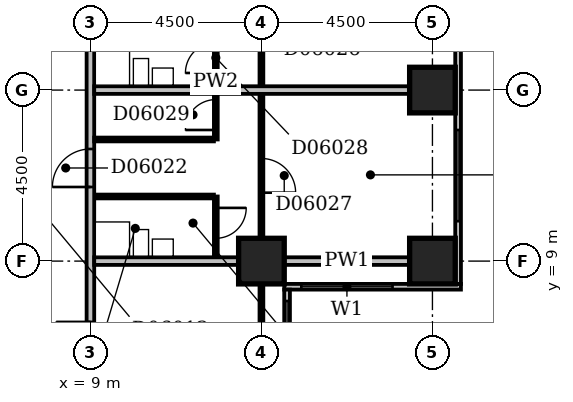
"""IFC4 building model, lengths in metres.
Left out: names, types, materials, properties, quantities, classifications, styles, units other than length and angle.
Written with IfcOpenShell. Run it as: python <this file> out.ifc"""

import sys

from ifc_helpers import new_model, si_unit, direction, frame, frame_2d, origin, origin_2d, place, context, subcontext, project, spatial, rectangle, extrude, element, fill, save


model = new_model("IFC4")
c1 = context("Model", 3, precision=1e-05, world=origin(), true_north=direction((0.0, 1.0)))
c2 = subcontext(c1, "Body", "Model", "MODEL_VIEW")
j1 = project(units=[si_unit("LENGTHUNIT", "METRE"), si_unit("PLANEANGLEUNIT", "RADIAN")], contexts=[c1])
p1 = place(None, origin())
s1 = spatial("IfcSite", under=j1, at=p1, CompositionType="ELEMENT")
p2 = place(p1, origin())
s2 = spatial("IfcBuilding", under=s1, at=p2, CompositionType="ELEMENT")
p3 = place(p2, frame((0.0, 0.0, 32.6)))
s3 = spatial("IfcBuildingStorey", under=s2, at=p3, CompositionType="ELEMENT", Elevation=32.6)
for number, where, z_axis, x_axis in (
    (1, (13.5, 9.0, -0.3), (0.0, 0.0, 1.0), (1.0, 0.0, 0.0)),
    (2, (18.0, 9.0, -0.3), (0.0, 0.0, 1.0), (1.0, 0.0, 0.0)),
    (3, (18.0, 13.5, -0.3), (0.0, 0.0, 1.0), (1.0, 0.0, 0.0)),
):
    element("IfcColumn", number, at=place(p3, frame(where, z_axis=z_axis, x_axis=x_axis)), inside=s3, PredefinedType="COLUMN", context=c2, shape_type="SweptSolid", body=[
        extrude(rectangle(XDim=1.2, YDim=1.2, at=origin_2d()), origin(), (0.0, 0.0, 1.0), 3.6),
    ])
p4 = place(p3, frame((14.175, 3.9, 0.0), z_axis=(0.0, 0.0, 1.0), x_axis=(0.0, 1.0, 0.0)))
e4 = element("IfcWall", 4, at=p4, inside=s3, PredefinedType="STANDARD", context=c2, shape_type="SweptSolid", body=[
    extrude(rectangle(XDim=4.35, YDim=0.15, at=frame_2d((2.175, 0.0))), origin(), (0.0, 0.0, 1.0), 2.7),
])
p5 = place(p4, frame((1.65, 0.0, 0.6)))
e5 = element("IfcOpeningElement", 5, at=p5, cuts=e4, PredefinedType="OPENING", context=c2, shape_type="SweptSolid", body=[
    extrude(rectangle(XDim=2.4, YDim=1.8, at=frame_2d((1.2, 0.9))), frame((0.0, 0.087, 0.0), z_axis=(0.0, -1.0, 0.0), x_axis=(1.0, 0.0, 0.0)), (0.0, 0.0, 1.0), 0.174),
])
p6 = place(p3, frame((14.1, 8.325, 0.0), z_axis=(0.0, 0.0, 1.0), x_axis=(1.0, 0.0, 0.0)))
e6 = element("IfcWall", 6, at=p6, inside=s3, PredefinedType="STANDARD", context=c2, shape_type="SweptSolid", body=[
    extrude(rectangle(XDim=4.65, YDim=0.15, at=frame_2d((2.325, 0.0))), origin(), (0.0, 0.0, 1.0), 2.7),
])
p7 = place(p6, frame((0.45, 0.0, 0.6)))
e7 = element("IfcOpeningElement", 7, at=p7, cuts=e6, PredefinedType="OPENING", context=c2, shape_type="SweptSolid", body=[
    extrude(rectangle(XDim=2.4, YDim=1.8, at=frame_2d((1.2, 0.9))), frame((0.0, 0.087, 0.0), z_axis=(0.0, -1.0, 0.0), x_axis=(1.0, 0.0, 0.0)), (0.0, 0.0, 1.0), 0.174),
])
p8 = place(p3, frame((18.675, 8.4, 0.0), z_axis=(0.0, 0.0, 1.0), x_axis=(0.0, 1.0, 0.0)))
e8 = element("IfcWall", 8, at=p8, inside=s3, PredefinedType="STANDARD", context=c2, shape_type="SweptSolid", body=[
    extrude(rectangle(XDim=8.85, YDim=0.15, at=frame_2d((4.425, 0.0))), origin(), (0.0, 0.0, 1.0), 2.7),
])
p9 = place(p8, frame((1.65, 0.0, 0.6)))
e9 = element("IfcOpeningElement", 9, at=p9, cuts=e8, PredefinedType="OPENING", context=c2, shape_type="SweptSolid", body=[
    extrude(rectangle(XDim=2.4, YDim=1.8, at=frame_2d((1.2, 0.9))), frame((0.0, 0.087, 0.0), z_axis=(0.0, -1.0, 0.0), x_axis=(1.0, 0.0, 0.0)), (0.0, 0.0, 1.0), 0.174),
])
p10 = place(p8, frame((7.309, 0.0, 0.6)))
e10 = element("IfcOpeningElement", 10, at=p10, cuts=e8, PredefinedType="OPENING", context=c2, shape_type="SweptSolid", body=[
    extrude(rectangle(XDim=1.2, YDim=1.8, at=frame_2d((0.6, 0.9))), frame((0.0, 0.087, 0.0), z_axis=(0.0, -1.0, 0.0), x_axis=(1.0, 0.0, 0.0)), (0.0, 0.0, 1.0), 0.174),
])
p11 = place(p3, frame((9.0, 5.0, 0.0), z_axis=(0.0, 0.0, 1.0), x_axis=(0.0, 1.0, 0.0)))
e11 = element("IfcWall", 11, at=p11, inside=s3, PredefinedType="PARTITIONING", context=c2, shape_type="SweptSolid", body=[
    extrude(rectangle(XDim=44.5, YDim=0.2, at=frame_2d((22.25, 0.0))), origin(), (0.0, 0.0, 1.0), 3.3),
])
p12 = place(p11, frame((24.7, 0.0, 0.0)))
e12 = element("IfcOpeningElement", 12, at=p12, cuts=e11, PredefinedType="OPENING", context=c2, shape_type="SweptSolid", body=[
    extrude(rectangle(XDim=1.0, YDim=2.1, at=frame_2d((0.5, 1.05))), frame((0.0, 0.112, 0.0), z_axis=(0.0, -1.0, 0.0), x_axis=(1.0, 0.0, 0.0)), (0.0, 0.0, 1.0), 0.224),
])
p13 = place(p11, frame((13.3, 0.0, 0.0)))
e13 = element("IfcOpeningElement", 13, at=p13, cuts=e11, PredefinedType="OPENING", context=c2, shape_type="SweptSolid", body=[
    extrude(rectangle(XDim=1.0, YDim=2.1, at=frame_2d((0.5, 1.05))), frame((0.0, 0.112, 0.0), z_axis=(0.0, -1.0, 0.0), x_axis=(1.0, 0.0, 0.0)), (0.0, 0.0, 1.0), 0.224),
])
p14 = place(p11, frame((10.45, 0.0, 0.0)))
e14 = element("IfcOpeningElement", 14, at=p14, cuts=e11, PredefinedType="OPENING", context=c2, shape_type="SweptSolid", body=[
    extrude(rectangle(XDim=1.0, YDim=2.1, at=frame_2d((0.5, 1.05))), frame((0.0, 0.112, 0.0), z_axis=(0.0, -1.0, 0.0), x_axis=(1.0, 0.0, 0.0)), (0.0, 0.0, 1.0), 0.224),
])
p15 = place(p11, frame((5.95, 0.0, 0.0)))
e15 = element("IfcOpeningElement", 15, at=p15, cuts=e11, PredefinedType="OPENING", context=c2, shape_type="SweptSolid", body=[
    extrude(rectangle(XDim=1.0, YDim=2.1, at=frame_2d((0.5, 1.05))), frame((0.0, 0.112, 0.0), z_axis=(0.0, -1.0, 0.0), x_axis=(1.0, 0.0, 0.0)), (0.0, 0.0, 1.0), 0.224),
])
p16 = place(p11, frame((37.25, 0.0, 0.0)))
e16 = element("IfcOpeningElement", 16, at=p16, cuts=e11, PredefinedType="OPENING", context=c2, shape_type="SweptSolid", body=[
    extrude(rectangle(XDim=0.9, YDim=2.1, at=frame_2d((0.45, 1.05))), frame((0.0, 0.112, 0.0), z_axis=(0.0, -1.0, 0.0), x_axis=(1.0, 0.0, 0.0)), (0.0, 0.0, 1.0), 0.224),
])
p17 = place(p11, frame((1.5, 0.0, 0.0)))
e17 = element("IfcOpeningElement", 17, at=p17, cuts=e11, PredefinedType="OPENING", context=c2, shape_type="SweptSolid", body=[
    extrude(rectangle(XDim=0.9, YDim=2.1, at=frame_2d((0.45, 1.05))), frame((0.0, 0.112, 0.0), z_axis=(0.0, -1.0, 0.0), x_axis=(1.0, 0.0, 0.0)), (0.0, 0.0, 1.0), 0.224),
])
p18 = place(p3, frame((13.5, 5.1, 0.0), z_axis=(0.0, 0.0, 1.0), x_axis=(0.0, 1.0, 0.0)))
e18 = element("IfcWall", 18, at=p18, inside=s3, PredefinedType="PARTITIONING", context=c2, shape_type="SweptSolid", body=[
    extrude(rectangle(XDim=3.3, YDim=0.1, at=frame_2d((1.65, 0.0))), origin(), (0.0, 0.0, 1.0), 2.7),
])
p19 = place(p3, frame((9.1, 9.0, 0.0), z_axis=(0.0, 0.0, 1.0), x_axis=(1.0, 0.0, 0.0)))
e19 = element("IfcWall", 19, at=p19, inside=s3, PredefinedType="PARTITIONING", context=c2, shape_type="SweptSolid", body=[
    extrude(rectangle(XDim=3.8, YDim=0.2, at=frame_2d((1.9, 0.0))), origin(), (0.0, 0.0, 1.0), 3.3),
])
p20 = place(p3, frame((14.1, 9.0, 0.0), z_axis=(0.0, 0.0, 1.0), x_axis=(1.0, 0.0, 0.0)))
e20 = element("IfcWall", 20, at=p20, inside=s3, PredefinedType="PARTITIONING", context=c2, shape_type="SweptSolid", body=[
    extrude(rectangle(XDim=3.3, YDim=0.2, at=frame_2d((1.65, 0.0))), origin(), (0.0, 0.0, 1.0), 2.7),
])
p21 = place(p3, frame((12.3, 9.1, 0.0), z_axis=(0.0, 0.0, 1.0), x_axis=(0.0, 1.0, 0.0)))
e21 = element("IfcWall", 21, at=p21, inside=s3, PredefinedType="PARTITIONING", context=c2, shape_type="SweptSolid", body=[
    extrude(rectangle(XDim=1.6, YDim=0.1, at=frame_2d((0.8, 0.0))), origin(), (0.0, 0.0, 1.0), 3.3),
])
p22 = place(p21, frame((0.5, 0.0, 0.0)))
e22 = element("IfcOpeningElement", 22, at=p22, cuts=e21, PredefinedType="OPENING", context=c2, shape_type="SweptSolid", body=[
    extrude(rectangle(XDim=0.8, YDim=2.1, at=frame_2d((0.4, 1.05))), frame((0.0, 0.062, 0.0), z_axis=(0.0, -1.0, 0.0), x_axis=(1.0, 0.0, 0.0)), (0.0, 0.0, 1.0), 0.124),
])
p23 = place(p3, frame((13.5, 9.6, 0.0), z_axis=(0.0, 0.0, 1.0), x_axis=(0.0, 1.0, 0.0)))
e23 = element("IfcWall", 23, at=p23, inside=s3, PredefinedType="PARTITIONING", context=c2, shape_type="SweptSolid", body=[
    extrude(rectangle(XDim=8.3, YDim=0.1, at=frame_2d((4.15, 0.0))), origin(), (0.0, 0.0, 1.0), 3.3),
])
p24 = place(p23, frame((5.7, 0.0, 0.0)))
e24 = element("IfcOpeningElement", 24, at=p24, cuts=e23, PredefinedType="OPENING", context=c2, shape_type="SweptSolid", body=[
    extrude(rectangle(XDim=0.9, YDim=2.1, at=frame_2d((0.45, 1.05))), frame((0.0, 0.062, 0.0), z_axis=(0.0, -1.0, 0.0), x_axis=(1.0, 0.0, 0.0)), (0.0, 0.0, 1.0), 0.124),
])
p25 = place(p23, frame((1.2, 0.0, 0.0)))
e25 = element("IfcOpeningElement", 25, at=p25, cuts=e23, PredefinedType="OPENING", context=c2, shape_type="SweptSolid", body=[
    extrude(rectangle(XDim=0.9, YDim=2.1, at=frame_2d((0.45, 1.05))), frame((0.0, 0.062, 0.0), z_axis=(0.0, -1.0, 0.0), x_axis=(1.0, 0.0, 0.0)), (0.0, 0.0, 1.0), 0.124),
])
p26 = place(p3, frame((9.1, 10.7, 0.0), z_axis=(0.0, 0.0, 1.0), x_axis=(1.0, 0.0, 0.0)))
e26 = element("IfcWall", 26, at=p26, inside=s3, PredefinedType="PLUMBINGWALL", context=c2, shape_type="SweptSolid", body=[
    extrude(rectangle(XDim=3.15, YDim=0.1, at=frame_2d((1.575, 0.0))), origin(), (0.0, 0.0, 1.0), 3.3),
])
p27 = place(p3, frame((9.1, 12.2, 0.0), z_axis=(0.0, 0.0, 1.0), x_axis=(1.0, 0.0, 0.0)))
e27 = element("IfcWall", 27, at=p27, inside=s3, PredefinedType="PARTITIONING", context=c2, shape_type="SweptSolid", body=[
    extrude(rectangle(XDim=3.15, YDim=0.1, at=frame_2d((1.575, 0.0))), origin(), (0.0, 0.0, 1.0), 3.3),
])
p28 = place(p3, frame((12.3, 12.2, 0.0), z_axis=(0.0, 0.0, 1.0), x_axis=(0.0, 1.0, 0.0)))
e28 = element("IfcWall", 28, at=p28, inside=s3, PredefinedType="PARTITIONING", context=c2, shape_type="SweptSolid", body=[
    extrude(rectangle(XDim=3.0, YDim=0.1, at=frame_2d((1.5, 0.0))), origin(), (0.0, 0.0, 1.0), 3.3),
])
p29 = place(p28, frame((1.75, 0.0, 0.0)))
e29 = element("IfcOpeningElement", 29, at=p29, cuts=e28, PredefinedType="OPENING", context=c2, shape_type="SweptSolid", body=[
    extrude(rectangle(XDim=0.8, YDim=2.1, at=frame_2d((0.4, 1.05))), frame((0.0, 0.062, 0.0), z_axis=(0.0, -1.0, 0.0), x_axis=(1.0, 0.0, 0.0)), (0.0, 0.0, 1.0), 0.124),
])
p30 = place(p28, frame((0.25, 0.0, 0.0)))
e30 = element("IfcOpeningElement", 30, at=p30, cuts=e28, PredefinedType="OPENING", context=c2, shape_type="SweptSolid", body=[
    extrude(rectangle(XDim=0.8, YDim=2.1, at=frame_2d((0.4, 1.05))), frame((0.0, 0.062, 0.0), z_axis=(0.0, -1.0, 0.0), x_axis=(1.0, 0.0, 0.0)), (0.0, 0.0, 1.0), 0.124),
])
p31 = place(p3, frame((9.1, 13.5, 0.0), z_axis=(0.0, 0.0, 1.0), x_axis=(1.0, 0.0, 0.0)))
e31 = element("IfcWall", 31, at=p31, inside=s3, PredefinedType="PARTITIONING", context=c2, shape_type="SweptSolid", body=[
    extrude(rectangle(XDim=8.3, YDim=0.2, at=frame_2d((4.15, 0.0))), origin(), (0.0, 0.0, 1.0), 3.3),
])
p32 = place(p5, origin())
e32 = element("IfcWindow", 32, at=p32, inside=s3, PartitioningType="SINGLE_PANEL", PredefinedType="WINDOW", context=c2, shape_type="SweptSolid", body=[
    extrude(rectangle(XDim=2.4, YDim=1.8, at=frame_2d((1.2, 0.9))), frame((0.0, 0.03, 0.0), z_axis=(0.0, -1.0, 0.0), x_axis=(1.0, 0.0, 0.0)), (0.0, 0.0, 1.0), 0.06),
])
fill(e5, e32)
p33 = place(p7, origin())
e33 = element("IfcWindow", 33, at=p33, inside=s3, PartitioningType="SINGLE_PANEL", PredefinedType="WINDOW", context=c2, shape_type="SweptSolid", body=[
    extrude(rectangle(XDim=2.4, YDim=1.8, at=frame_2d((1.2, 0.9))), frame((0.0, 0.03, 0.0), z_axis=(0.0, -1.0, 0.0), x_axis=(1.0, 0.0, 0.0)), (0.0, 0.0, 1.0), 0.06),
])
fill(e7, e33)
p34 = place(p9, origin())
e34 = element("IfcWindow", 34, at=p34, inside=s3, PartitioningType="SINGLE_PANEL", PredefinedType="WINDOW", context=c2, shape_type="SweptSolid", body=[
    extrude(rectangle(XDim=2.4, YDim=1.8, at=frame_2d((1.2, 0.9))), frame((0.0, 0.03, 0.0), z_axis=(0.0, -1.0, 0.0), x_axis=(1.0, 0.0, 0.0)), (0.0, 0.0, 1.0), 0.06),
])
fill(e9, e34)
p35 = place(p15, origin())
e35 = element("IfcDoor", 35, at=p35, inside=s3, OperationType="SINGLE_SWING_LEFT", PredefinedType="DOOR", context=c2, shape_type="SweptSolid", body=[
    extrude(rectangle(XDim=1.0, YDim=2.1, at=frame_2d((0.5, 1.05))), frame((0.0, 0.025, 0.0), z_axis=(0.0, -1.0, 0.0), x_axis=(1.0, 0.0, 0.0)), (0.0, 0.0, 1.0), 0.05),
])
fill(e15, e35)
p36 = place(p22, origin())
e36 = element("IfcDoor", 36, at=p36, inside=s3, OperationType="SINGLE_SWING_RIGHT", PredefinedType="DOOR", context=c2, shape_type="SweptSolid", body=[
    extrude(rectangle(XDim=0.8, YDim=2.1, at=frame_2d((0.4, 1.05))), frame((0.0, 0.025, 0.0), z_axis=(0.0, -1.0, 0.0), x_axis=(1.0, 0.0, 0.0)), (0.0, 0.0, 1.0), 0.05),
])
fill(e22, e36)
p37 = place(p25, frame((0.9, 0.0, 0.0), z_axis=(0.0, 0.0, 1.0), x_axis=(-1.0, 0.0, 0.0)))
e37 = element("IfcDoor", 37, at=p37, inside=s3, OperationType="SINGLE_SWING_RIGHT", PredefinedType="DOOR", context=c2, shape_type="SweptSolid", body=[
    extrude(rectangle(XDim=0.9, YDim=2.1, at=frame_2d((0.45, 1.05))), frame((0.0, 0.025, 0.0), z_axis=(0.0, -1.0, 0.0), x_axis=(1.0, 0.0, 0.0)), (0.0, 0.0, 1.0), 0.05),
])
fill(e25, e37)
p38 = place(p29, origin())
e38 = element("IfcDoor", 38, at=p38, inside=s3, OperationType="SINGLE_SWING_LEFT", PredefinedType="DOOR", context=c2, shape_type="SweptSolid", body=[
    extrude(rectangle(XDim=0.8, YDim=2.1, at=frame_2d((0.4, 1.05))), frame((0.0, 0.025, 0.0), z_axis=(0.0, -1.0, 0.0), x_axis=(1.0, 0.0, 0.0)), (0.0, 0.0, 1.0), 0.05),
])
fill(e29, e38)
p39 = place(p30, origin())
e39 = element("IfcDoor", 39, at=p39, inside=s3, OperationType="SINGLE_SWING_LEFT", PredefinedType="DOOR", context=c2, shape_type="SweptSolid", body=[
    extrude(rectangle(XDim=0.8, YDim=2.1, at=frame_2d((0.4, 1.05))), frame((0.0, 0.025, 0.0), z_axis=(0.0, -1.0, 0.0), x_axis=(1.0, 0.0, 0.0)), (0.0, 0.0, 1.0), 0.05),
])
fill(e30, e39)
save(model, sys.argv[1])
